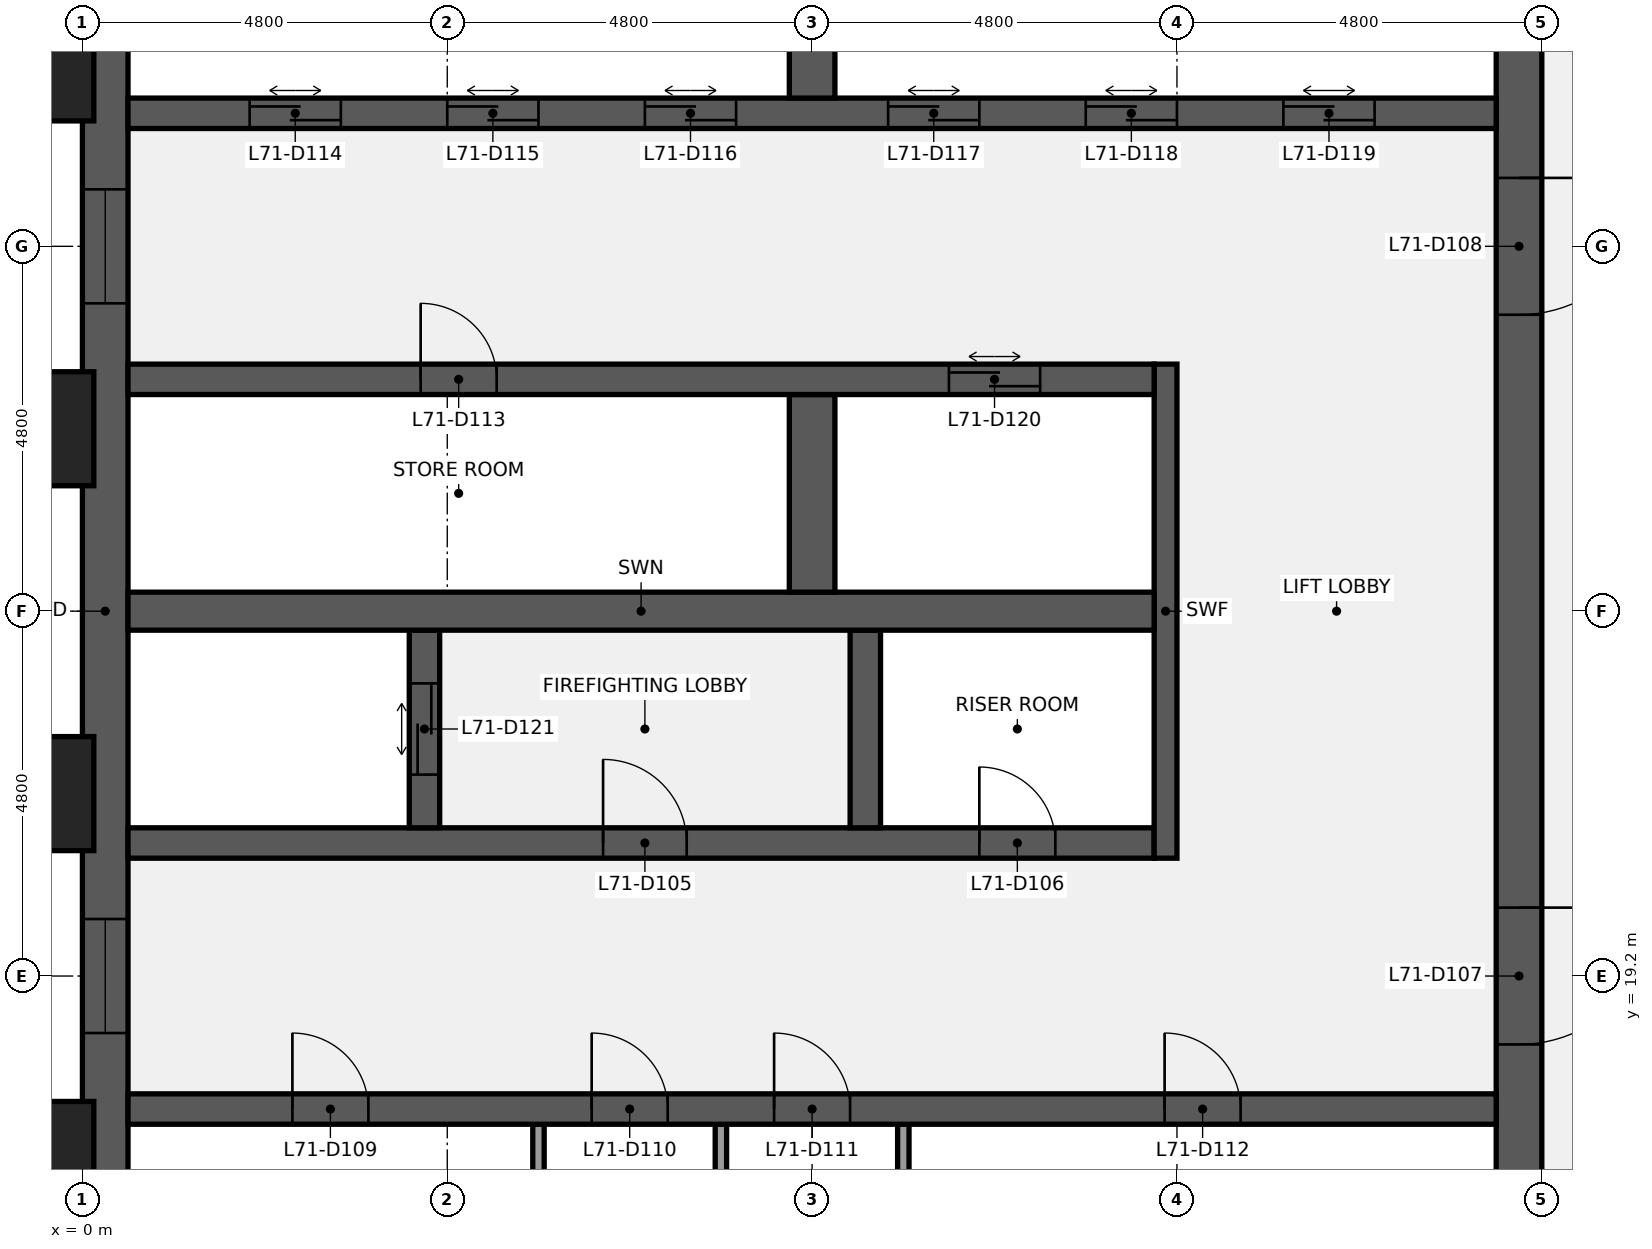
"""IFC4 building model, lengths in metres.
Left out: names, types, materials, properties, quantities, classifications, styles, units other than length and angle.
Written with IfcOpenShell. Run it as: python <this file> out.ifc"""

import sys

from ifc_helpers import new_model, si_unit, direction, frame, frame_2d, origin, origin_2d, place, context, subcontext, project, spatial, rectangle, extrude, element, fill, save


model = new_model("IFC4")
c1 = context("Model", 3, precision=1e-05, world=origin(), true_north=direction((0.0, 1.0)))
c2 = subcontext(c1, "Body", "Model", "MODEL_VIEW")
j1 = project(units=[si_unit("LENGTHUNIT", "METRE"), si_unit("PLANEANGLEUNIT", "RADIAN")], contexts=[c1])
p1 = place(None, origin())
s1 = spatial("IfcSite", under=j1, at=p1, CompositionType="ELEMENT")
p2 = place(p1, origin())
s2 = spatial("IfcBuilding", under=s1, at=p2, CompositionType="ELEMENT")
p3 = place(p2, frame((0.0, 0.0, 322.3)))
s3 = spatial("IfcBuildingStorey", under=s2, at=p3, CompositionType="ELEMENT", Elevation=322.3)
p4 = place(p3, frame((0.3, 9.6, 0.0), z_axis=(0.0, 0.0, 1.0), x_axis=(0.0, 1.0, 0.0)))
e1 = element("IfcWall", 1, at=p4, inside=s3, PredefinedType="SHEAR", context=c2, shape_type="SweptSolid", body=[
    extrude(rectangle(XDim=28.8, YDim=0.6, at=frame_2d((14.4, 0.0))), origin(), (0.0, 0.0, 1.0), 3.84),
])
p5 = place(p4, frame((8.85, 0.0, 0.9)))
e2 = element("IfcOpeningElement", 2, at=p5, cuts=e1, PredefinedType="OPENING", context=c2, shape_type="SweptSolid", body=[
    extrude(rectangle(XDim=1.5, YDim=1.5, at=frame_2d((0.75, 0.75))), frame((0.0, 0.31, 0.0), z_axis=(0.0, -1.0, 0.0), x_axis=(1.0, 0.0, 0.0)), (0.0, 0.0, 1.0), 0.62),
])
p6 = place(p4, frame((18.45, 0.0, 0.9)))
e3 = element("IfcOpeningElement", 3, at=p6, cuts=e1, PredefinedType="OPENING", context=c2, shape_type="SweptSolid", body=[
    extrude(rectangle(XDim=1.5, YDim=1.5, at=frame_2d((0.75, 0.75))), frame((0.0, 0.31, 0.0), z_axis=(0.0, -1.0, 0.0), x_axis=(1.0, 0.0, 0.0)), (0.0, 0.0, 1.0), 0.62),
])
p7 = place(p3, frame((18.9, 38.4, 0.0), z_axis=(0.0, 0.0, 1.0), x_axis=(0.0, -1.0, 0.0)))
e4 = element("IfcWall", 4, at=p7, inside=s3, PredefinedType="SHEAR", context=c2, shape_type="SweptSolid", body=[
    extrude(rectangle(XDim=28.8, YDim=0.6, at=frame_2d((14.4, 0.0))), origin(), (0.0, 0.0, 1.0), 3.84),
])
p8 = place(p7, frame((18.3, 0.0, 0.0)))
e5 = element("IfcOpeningElement", 5, at=p8, cuts=e4, PredefinedType="OPENING", context=c2, shape_type="SweptSolid", body=[
    extrude(rectangle(XDim=1.8, YDim=2.1, at=frame_2d((0.9, 1.05))), frame((0.0, 0.31, 0.0), z_axis=(0.0, -1.0, 0.0), x_axis=(1.0, 0.0, 0.0)), (0.0, 0.0, 1.0), 0.62),
])
p9 = place(p7, frame((8.7, 0.0, 0.0)))
e6 = element("IfcOpeningElement", 6, at=p9, cuts=e4, PredefinedType="OPENING", context=c2, shape_type="SweptSolid", body=[
    extrude(rectangle(XDim=1.8, YDim=2.1, at=frame_2d((0.9, 1.05))), frame((0.0, 0.31, 0.0), z_axis=(0.0, -1.0, 0.0), x_axis=(1.0, 0.0, 0.0)), (0.0, 0.0, 1.0), 0.62),
])
for number, where, z_axis, x_axis in (
    (7, (6.0, 14.65, 0.0), (0.0, 0.0, 1.0), (0.0, 1.0, 0.0)),
    (8, (8.4, 14.65, 0.0), (0.0, 0.0, 1.0), (0.0, 1.0, 0.0)),
    (9, (10.8, 14.65, 0.0), (0.0, 0.0, 1.0), (0.0, 1.0, 0.0)),
):
    element("IfcWall", number, at=place(p3, frame(where, z_axis=z_axis, x_axis=x_axis)), inside=s3, PredefinedType="PARTITIONING", context=c2, shape_type="SweptSolid", body=[
        extrude(rectangle(XDim=2.6, YDim=0.15, at=frame_2d((1.3, 0.0))), origin(), (0.0, 0.0, 1.0), 3.84),
    ])
p10 = place(p3, frame((0.6, 17.45, 0.0), z_axis=(0.0, 0.0, 1.0), x_axis=(1.0, 0.0, 0.0)))
e10 = element("IfcWall", 10, at=p10, inside=s3, PredefinedType="SHEAR", context=c2, shape_type="SweptSolid", body=[
    extrude(rectangle(XDim=18.0, YDim=0.4, at=frame_2d((9.0, 0.0))), origin(), (0.0, 0.0, 1.0), 3.84),
])
p11 = place(p10, frame((2.163, 0.0, 0.0)))
e11 = element("IfcOpeningElement", 11, at=p11, cuts=e10, PredefinedType="OPENING", context=c2, shape_type="SweptSolid", body=[
    extrude(rectangle(XDim=1.0, YDim=2.1, at=frame_2d((0.5, 1.05))), frame((0.0, 0.21, 0.0), z_axis=(0.0, -1.0, 0.0), x_axis=(1.0, 0.0, 0.0)), (0.0, 0.0, 1.0), 0.42),
])
p12 = place(p10, frame((6.1, 0.0, 0.0)))
e12 = element("IfcOpeningElement", 12, at=p12, cuts=e10, PredefinedType="OPENING", context=c2, shape_type="SweptSolid", body=[
    extrude(rectangle(XDim=1.0, YDim=2.1, at=frame_2d((0.5, 1.05))), frame((0.0, 0.21, 0.0), z_axis=(0.0, -1.0, 0.0), x_axis=(1.0, 0.0, 0.0)), (0.0, 0.0, 1.0), 0.42),
])
p13 = place(p10, frame((8.5, 0.0, 0.0)))
e13 = element("IfcOpeningElement", 13, at=p13, cuts=e10, PredefinedType="OPENING", context=c2, shape_type="SweptSolid", body=[
    extrude(rectangle(XDim=1.0, YDim=2.1, at=frame_2d((0.5, 1.05))), frame((0.0, 0.21, 0.0), z_axis=(0.0, -1.0, 0.0), x_axis=(1.0, 0.0, 0.0)), (0.0, 0.0, 1.0), 0.42),
])
p14 = place(p10, frame((13.637, 0.0, 0.0)))
e14 = element("IfcOpeningElement", 14, at=p14, cuts=e10, PredefinedType="OPENING", context=c2, shape_type="SweptSolid", body=[
    extrude(rectangle(XDim=1.0, YDim=2.1, at=frame_2d((0.5, 1.05))), frame((0.0, 0.21, 0.0), z_axis=(0.0, -1.0, 0.0), x_axis=(1.0, 0.0, 0.0)), (0.0, 0.0, 1.0), 0.42),
])
p15 = place(p3, frame((0.6, 20.95, 0.0), z_axis=(0.0, 0.0, 1.0), x_axis=(1.0, 0.0, 0.0)))
e15 = element("IfcWall", 15, at=p15, inside=s3, PredefinedType="SHEAR", context=c2, shape_type="SweptSolid", body=[
    extrude(rectangle(XDim=13.5, YDim=0.4, at=frame_2d((6.75, 0.0))), origin(), (0.0, 0.0, 1.0), 3.84),
])
p16 = place(p15, frame((6.25, 0.0, 0.0)))
e16 = element("IfcOpeningElement", 16, at=p16, cuts=e15, PredefinedType="OPENING", context=c2, shape_type="SweptSolid", body=[
    extrude(rectangle(XDim=1.1, YDim=2.1, at=frame_2d((0.55, 1.05))), frame((0.0, 0.21, 0.0), z_axis=(0.0, -1.0, 0.0), x_axis=(1.0, 0.0, 0.0)), (0.0, 0.0, 1.0), 0.42),
])
p17 = place(p15, frame((11.2, 0.0, 0.0)))
e17 = element("IfcOpeningElement", 17, at=p17, cuts=e15, PredefinedType="OPENING", context=c2, shape_type="SweptSolid", body=[
    extrude(rectangle(XDim=1.0, YDim=2.1, at=frame_2d((0.5, 1.05))), frame((0.0, 0.21, 0.0), z_axis=(0.0, -1.0, 0.0), x_axis=(1.0, 0.0, 0.0)), (0.0, 0.0, 1.0), 0.42),
])
p18 = place(p3, frame((14.25, 20.75, 0.0), z_axis=(0.0, 0.0, 1.0), x_axis=(0.0, 1.0, 0.0)))
e18 = element("IfcWall", 18, at=p18, inside=s3, PredefinedType="SHEAR", context=c2, shape_type="SweptSolid", body=[
    extrude(rectangle(XDim=6.5, YDim=0.3, at=frame_2d((3.25, 0.0))), origin(), (0.0, 0.0, 1.0), 3.84),
])
p19 = place(p3, frame((4.5, 21.15, 0.0), z_axis=(0.0, 0.0, 1.0), x_axis=(0.0, 1.0, 0.0)))
e19 = element("IfcWall", 19, at=p19, inside=s3, PredefinedType="SHEAR", context=c2, shape_type="SweptSolid", body=[
    extrude(rectangle(XDim=2.6, YDim=0.4, at=frame_2d((1.3, 0.0))), origin(), (0.0, 0.0, 1.0), 3.84),
])
p20 = place(p19, frame((0.7, 0.0, 0.0)))
e20 = element("IfcOpeningElement", 20, at=p20, cuts=e19, PredefinedType="OPENING", context=c2, shape_type="SweptSolid", body=[
    extrude(rectangle(XDim=1.2, YDim=2.1, at=frame_2d((0.6, 1.05))), frame((0.0, 0.21, 0.0), z_axis=(0.0, -1.0, 0.0), x_axis=(1.0, 0.0, 0.0)), (0.0, 0.0, 1.0), 0.42),
])
p21 = place(p3, frame((10.3, 21.15, 0.0), z_axis=(0.0, 0.0, 1.0), x_axis=(0.0, 1.0, 0.0)))
e21 = element("IfcWall", 21, at=p21, inside=s3, PredefinedType="SHEAR", context=c2, shape_type="SweptSolid", body=[
    extrude(rectangle(XDim=2.6, YDim=0.4, at=frame_2d((1.3, 0.0))), origin(), (0.0, 0.0, 1.0), 3.84),
])
p22 = place(p3, frame((0.6, 24.0, 0.0), z_axis=(0.0, 0.0, 1.0), x_axis=(1.0, 0.0, 0.0)))
e22 = element("IfcWall", 22, at=p22, inside=s3, PredefinedType="SHEAR", context=c2, shape_type="SweptSolid", body=[
    extrude(rectangle(XDim=13.5, YDim=0.5, at=frame_2d((6.75, 0.0))), origin(), (0.0, 0.0, 1.0), 3.84),
])
p23 = place(p3, frame((9.6, 24.25, 0.0), z_axis=(0.0, 0.0, 1.0), x_axis=(0.0, 1.0, 0.0)))
e23 = element("IfcWall", 23, at=p23, inside=s3, PredefinedType="SHEAR", context=c2, shape_type="SweptSolid", body=[
    extrude(rectangle(XDim=2.6, YDim=0.6, at=frame_2d((1.3, 0.0))), origin(), (0.0, 0.0, 1.0), 3.84),
])
p24 = place(p3, frame((0.6, 27.05, 0.0), z_axis=(0.0, 0.0, 1.0), x_axis=(1.0, 0.0, 0.0)))
e24 = element("IfcWall", 24, at=p24, inside=s3, PredefinedType="SHEAR", context=c2, shape_type="SweptSolid", body=[
    extrude(rectangle(XDim=13.5, YDim=0.4, at=frame_2d((6.75, 0.0))), origin(), (0.0, 0.0, 1.0), 3.84),
])
p25 = place(p24, frame((3.85, 0.0, 0.0)))
e25 = element("IfcOpeningElement", 25, at=p25, cuts=e24, PredefinedType="OPENING", context=c2, shape_type="SweptSolid", body=[
    extrude(rectangle(XDim=1.0, YDim=2.1, at=frame_2d((0.5, 1.05))), frame((0.0, 0.21, 0.0), z_axis=(0.0, -1.0, 0.0), x_axis=(1.0, 0.0, 0.0)), (0.0, 0.0, 1.0), 0.42),
])
p26 = place(p24, frame((10.8, 0.0, 0.0)))
e26 = element("IfcOpeningElement", 26, at=p26, cuts=e24, PredefinedType="OPENING", context=c2, shape_type="SweptSolid", body=[
    extrude(rectangle(XDim=1.2, YDim=2.1, at=frame_2d((0.6, 1.05))), frame((0.0, 0.21, 0.0), z_axis=(0.0, -1.0, 0.0), x_axis=(1.0, 0.0, 0.0)), (0.0, 0.0, 1.0), 0.42),
])
p27 = place(p3, frame((0.6, 30.55, 0.0), z_axis=(0.0, 0.0, 1.0), x_axis=(1.0, 0.0, 0.0)))
e27 = element("IfcWall", 27, at=p27, inside=s3, PredefinedType="SHEAR", context=c2, shape_type="SweptSolid", body=[
    extrude(rectangle(XDim=18.0, YDim=0.4, at=frame_2d((9.0, 0.0))), origin(), (0.0, 0.0, 1.0), 3.84),
])
p28 = place(p27, frame((1.6, 0.0, 0.0)))
e28 = element("IfcOpeningElement", 28, at=p28, cuts=e27, PredefinedType="OPENING", context=c2, shape_type="SweptSolid", body=[
    extrude(rectangle(XDim=1.2, YDim=2.1, at=frame_2d((0.6, 1.05))), frame((0.0, 0.21, 0.0), z_axis=(0.0, -1.0, 0.0), x_axis=(1.0, 0.0, 0.0)), (0.0, 0.0, 1.0), 0.42),
])
p29 = place(p27, frame((4.2, 0.0, 0.0)))
e29 = element("IfcOpeningElement", 29, at=p29, cuts=e27, PredefinedType="OPENING", context=c2, shape_type="SweptSolid", body=[
    extrude(rectangle(XDim=1.2, YDim=2.1, at=frame_2d((0.6, 1.05))), frame((0.0, 0.21, 0.0), z_axis=(0.0, -1.0, 0.0), x_axis=(1.0, 0.0, 0.0)), (0.0, 0.0, 1.0), 0.42),
])
p30 = place(p27, frame((6.8, 0.0, 0.0)))
e30 = element("IfcOpeningElement", 30, at=p30, cuts=e27, PredefinedType="OPENING", context=c2, shape_type="SweptSolid", body=[
    extrude(rectangle(XDim=1.2, YDim=2.1, at=frame_2d((0.6, 1.05))), frame((0.0, 0.21, 0.0), z_axis=(0.0, -1.0, 0.0), x_axis=(1.0, 0.0, 0.0)), (0.0, 0.0, 1.0), 0.42),
])
p31 = place(p27, frame((10.0, 0.0, 0.0)))
e31 = element("IfcOpeningElement", 31, at=p31, cuts=e27, PredefinedType="OPENING", context=c2, shape_type="SweptSolid", body=[
    extrude(rectangle(XDim=1.2, YDim=2.1, at=frame_2d((0.6, 1.05))), frame((0.0, 0.21, 0.0), z_axis=(0.0, -1.0, 0.0), x_axis=(1.0, 0.0, 0.0)), (0.0, 0.0, 1.0), 0.42),
])
p32 = place(p27, frame((12.6, 0.0, 0.0)))
e32 = element("IfcOpeningElement", 32, at=p32, cuts=e27, PredefinedType="OPENING", context=c2, shape_type="SweptSolid", body=[
    extrude(rectangle(XDim=1.2, YDim=2.1, at=frame_2d((0.6, 1.05))), frame((0.0, 0.21, 0.0), z_axis=(0.0, -1.0, 0.0), x_axis=(1.0, 0.0, 0.0)), (0.0, 0.0, 1.0), 0.42),
])
p33 = place(p27, frame((15.2, 0.0, 0.0)))
e33 = element("IfcOpeningElement", 33, at=p33, cuts=e27, PredefinedType="OPENING", context=c2, shape_type="SweptSolid", body=[
    extrude(rectangle(XDim=1.2, YDim=2.1, at=frame_2d((0.6, 1.05))), frame((0.0, 0.21, 0.0), z_axis=(0.0, -1.0, 0.0), x_axis=(1.0, 0.0, 0.0)), (0.0, 0.0, 1.0), 0.42),
])
p34 = place(p3, frame((9.6, 30.75, 0.0), z_axis=(0.0, 0.0, 1.0), x_axis=(0.0, 1.0, 0.0)))
e34 = element("IfcWall", 34, at=p34, inside=s3, PredefinedType="SHEAR", context=c2, shape_type="SweptSolid", body=[
    extrude(rectangle(XDim=2.6, YDim=0.6, at=frame_2d((1.3, 0.0))), origin(), (0.0, 0.0, 1.0), 3.84),
])
for number, where, z_axis, x_axis in (
    (35, (-0.75, 16.8, 0.0), (0.0, 0.0, 1.0), (0.0, 1.0, 0.0)),
    (36, (-0.75, 21.6, 0.0), (0.0, 0.0, 1.0), (0.0, 1.0, 0.0)),
    (37, (-0.75, 26.4, 0.0), (0.0, 0.0, 1.0), (0.0, 1.0, 0.0)),
    (38, (-0.75, 31.2, 0.0), (0.0, 0.0, 1.0), (0.0, 1.0, 0.0)),
):
    element("IfcColumn", number, at=place(p3, frame(where, z_axis=z_axis, x_axis=x_axis)), inside=s3, PredefinedType="PILASTER", context=c2, shape_type="SweptSolid", body=[
        extrude(rectangle(XDim=1.8, YDim=1.5, at=origin_2d()), origin(), (0.0, 0.0, 1.0), 4.0),
    ])
p35 = place(p16, origin())
e39 = element("IfcDoor", 39, at=p35, inside=s3, OperationType="SINGLE_SWING_LEFT", PredefinedType="DOOR", context=c2, shape_type="SweptSolid", body=[
    extrude(rectangle(XDim=1.1, YDim=2.1, at=frame_2d((0.55, 1.05))), frame((0.0, 0.025, 0.0), z_axis=(0.0, -1.0, 0.0), x_axis=(1.0, 0.0, 0.0)), (0.0, 0.0, 1.0), 0.05),
])
fill(e16, e39)
p36 = place(p17, origin())
e40 = element("IfcDoor", 40, at=p36, inside=s3, OperationType="SINGLE_SWING_LEFT", PredefinedType="DOOR", context=c2, shape_type="SweptSolid", body=[
    extrude(rectangle(XDim=1.0, YDim=2.1, at=frame_2d((0.5, 1.05))), frame((0.0, 0.025, 0.0), z_axis=(0.0, -1.0, 0.0), x_axis=(1.0, 0.0, 0.0)), (0.0, 0.0, 1.0), 0.05),
])
fill(e17, e40)
p37 = place(p8, origin())
e41 = element("IfcDoor", 41, at=p37, inside=s3, OperationType="DOUBLE_DOOR_SINGLE_SWING", PredefinedType="DOOR", context=c2, shape_type="SweptSolid", body=[
    extrude(rectangle(XDim=1.8, YDim=2.1, at=frame_2d((0.9, 1.05))), frame((0.0, 0.025, 0.0), z_axis=(0.0, -1.0, 0.0), x_axis=(1.0, 0.0, 0.0)), (0.0, 0.0, 1.0), 0.05),
])
fill(e5, e41)
p38 = place(p9, origin())
e42 = element("IfcDoor", 42, at=p38, inside=s3, OperationType="DOUBLE_DOOR_SINGLE_SWING", PredefinedType="DOOR", context=c2, shape_type="SweptSolid", body=[
    extrude(rectangle(XDim=1.8, YDim=2.1, at=frame_2d((0.9, 1.05))), frame((0.0, 0.025, 0.0), z_axis=(0.0, -1.0, 0.0), x_axis=(1.0, 0.0, 0.0)), (0.0, 0.0, 1.0), 0.05),
])
fill(e6, e42)
p39 = place(p11, origin())
e43 = element("IfcDoor", 43, at=p39, inside=s3, OperationType="SINGLE_SWING_LEFT", PredefinedType="DOOR", context=c2, shape_type="SweptSolid", body=[
    extrude(rectangle(XDim=1.0, YDim=2.1, at=frame_2d((0.5, 1.05))), frame((0.0, 0.025, 0.0), z_axis=(0.0, -1.0, 0.0), x_axis=(1.0, 0.0, 0.0)), (0.0, 0.0, 1.0), 0.05),
])
fill(e11, e43)
p40 = place(p12, origin())
e44 = element("IfcDoor", 44, at=p40, inside=s3, OperationType="SINGLE_SWING_LEFT", PredefinedType="DOOR", context=c2, shape_type="SweptSolid", body=[
    extrude(rectangle(XDim=1.0, YDim=2.1, at=frame_2d((0.5, 1.05))), frame((0.0, 0.025, 0.0), z_axis=(0.0, -1.0, 0.0), x_axis=(1.0, 0.0, 0.0)), (0.0, 0.0, 1.0), 0.05),
])
fill(e12, e44)
p41 = place(p13, origin())
e45 = element("IfcDoor", 45, at=p41, inside=s3, OperationType="SINGLE_SWING_LEFT", PredefinedType="DOOR", context=c2, shape_type="SweptSolid", body=[
    extrude(rectangle(XDim=1.0, YDim=2.1, at=frame_2d((0.5, 1.05))), frame((0.0, 0.025, 0.0), z_axis=(0.0, -1.0, 0.0), x_axis=(1.0, 0.0, 0.0)), (0.0, 0.0, 1.0), 0.05),
])
fill(e13, e45)
p42 = place(p14, origin())
e46 = element("IfcDoor", 46, at=p42, inside=s3, OperationType="SINGLE_SWING_LEFT", PredefinedType="DOOR", context=c2, shape_type="SweptSolid", body=[
    extrude(rectangle(XDim=1.0, YDim=2.1, at=frame_2d((0.5, 1.05))), frame((0.0, 0.025, 0.0), z_axis=(0.0, -1.0, 0.0), x_axis=(1.0, 0.0, 0.0)), (0.0, 0.0, 1.0), 0.05),
])
fill(e14, e46)
p43 = place(p25, origin())
e47 = element("IfcDoor", 47, at=p43, inside=s3, OperationType="SINGLE_SWING_LEFT", PredefinedType="DOOR", context=c2, shape_type="SweptSolid", body=[
    extrude(rectangle(XDim=1.0, YDim=2.1, at=frame_2d((0.5, 1.05))), frame((0.0, 0.025, 0.0), z_axis=(0.0, -1.0, 0.0), x_axis=(1.0, 0.0, 0.0)), (0.0, 0.0, 1.0), 0.05),
])
fill(e25, e47)
p44 = place(p28, origin())
e48 = element("IfcDoor", 48, at=p44, inside=s3, OperationType="DOUBLE_DOOR_SLIDING", PredefinedType="DOOR", context=c2, shape_type="SweptSolid", body=[
    extrude(rectangle(XDim=1.2, YDim=2.1, at=frame_2d((0.6, 1.05))), frame((0.0, 0.025, 0.0), z_axis=(0.0, -1.0, 0.0), x_axis=(1.0, 0.0, 0.0)), (0.0, 0.0, 1.0), 0.05),
])
fill(e28, e48)
p45 = place(p29, origin())
e49 = element("IfcDoor", 49, at=p45, inside=s3, OperationType="DOUBLE_DOOR_SLIDING", PredefinedType="DOOR", context=c2, shape_type="SweptSolid", body=[
    extrude(rectangle(XDim=1.2, YDim=2.1, at=frame_2d((0.6, 1.05))), frame((0.0, 0.025, 0.0), z_axis=(0.0, -1.0, 0.0), x_axis=(1.0, 0.0, 0.0)), (0.0, 0.0, 1.0), 0.05),
])
fill(e29, e49)
p46 = place(p30, origin())
e50 = element("IfcDoor", 50, at=p46, inside=s3, OperationType="DOUBLE_DOOR_SLIDING", PredefinedType="DOOR", context=c2, shape_type="SweptSolid", body=[
    extrude(rectangle(XDim=1.2, YDim=2.1, at=frame_2d((0.6, 1.05))), frame((0.0, 0.025, 0.0), z_axis=(0.0, -1.0, 0.0), x_axis=(1.0, 0.0, 0.0)), (0.0, 0.0, 1.0), 0.05),
])
fill(e30, e50)
p47 = place(p31, origin())
e51 = element("IfcDoor", 51, at=p47, inside=s3, OperationType="DOUBLE_DOOR_SLIDING", PredefinedType="DOOR", context=c2, shape_type="SweptSolid", body=[
    extrude(rectangle(XDim=1.2, YDim=2.1, at=frame_2d((0.6, 1.05))), frame((0.0, 0.025, 0.0), z_axis=(0.0, -1.0, 0.0), x_axis=(1.0, 0.0, 0.0)), (0.0, 0.0, 1.0), 0.05),
])
fill(e31, e51)
p48 = place(p32, origin())
e52 = element("IfcDoor", 52, at=p48, inside=s3, OperationType="DOUBLE_DOOR_SLIDING", PredefinedType="DOOR", context=c2, shape_type="SweptSolid", body=[
    extrude(rectangle(XDim=1.2, YDim=2.1, at=frame_2d((0.6, 1.05))), frame((0.0, 0.025, 0.0), z_axis=(0.0, -1.0, 0.0), x_axis=(1.0, 0.0, 0.0)), (0.0, 0.0, 1.0), 0.05),
])
fill(e32, e52)
p49 = place(p33, origin())
e53 = element("IfcDoor", 53, at=p49, inside=s3, OperationType="DOUBLE_DOOR_SLIDING", PredefinedType="DOOR", context=c2, shape_type="SweptSolid", body=[
    extrude(rectangle(XDim=1.2, YDim=2.1, at=frame_2d((0.6, 1.05))), frame((0.0, 0.025, 0.0), z_axis=(0.0, -1.0, 0.0), x_axis=(1.0, 0.0, 0.0)), (0.0, 0.0, 1.0), 0.05),
])
fill(e33, e53)
p50 = place(p26, origin())
e54 = element("IfcDoor", 54, at=p50, inside=s3, OperationType="DOUBLE_DOOR_SLIDING", PredefinedType="DOOR", context=c2, shape_type="SweptSolid", body=[
    extrude(rectangle(XDim=1.2, YDim=2.1, at=frame_2d((0.6, 1.05))), frame((0.0, 0.025, 0.0), z_axis=(0.0, -1.0, 0.0), x_axis=(1.0, 0.0, 0.0)), (0.0, 0.0, 1.0), 0.05),
])
fill(e26, e54)
p51 = place(p20, origin())
e55 = element("IfcDoor", 55, at=p51, inside=s3, OperationType="DOUBLE_DOOR_SLIDING", PredefinedType="DOOR", context=c2, shape_type="SweptSolid", body=[
    extrude(rectangle(XDim=1.2, YDim=2.1, at=frame_2d((0.6, 1.05))), frame((0.0, 0.025, 0.0), z_axis=(0.0, -1.0, 0.0), x_axis=(1.0, 0.0, 0.0)), (0.0, 0.0, 1.0), 0.05),
])
fill(e20, e55)
p52 = place(p5, origin())
e56 = element("IfcWindow", 56, at=p52, inside=s3, PartitioningType="SINGLE_PANEL", PredefinedType="WINDOW", context=c2, shape_type="SweptSolid", body=[
    extrude(rectangle(XDim=1.5, YDim=1.5, at=frame_2d((0.75, 0.75))), frame((0.0, 0.03, 0.0), z_axis=(0.0, -1.0, 0.0), x_axis=(1.0, 0.0, 0.0)), (0.0, 0.0, 1.0), 0.06),
])
fill(e2, e56)
p53 = place(p6, origin())
e57 = element("IfcWindow", 57, at=p53, inside=s3, PartitioningType="SINGLE_PANEL", PredefinedType="WINDOW", context=c2, shape_type="SweptSolid", body=[
    extrude(rectangle(XDim=1.5, YDim=1.5, at=frame_2d((0.75, 0.75))), frame((0.0, 0.03, 0.0), z_axis=(0.0, -1.0, 0.0), x_axis=(1.0, 0.0, 0.0)), (0.0, 0.0, 1.0), 0.06),
])
fill(e3, e57)
save(model, sys.argv[1])
